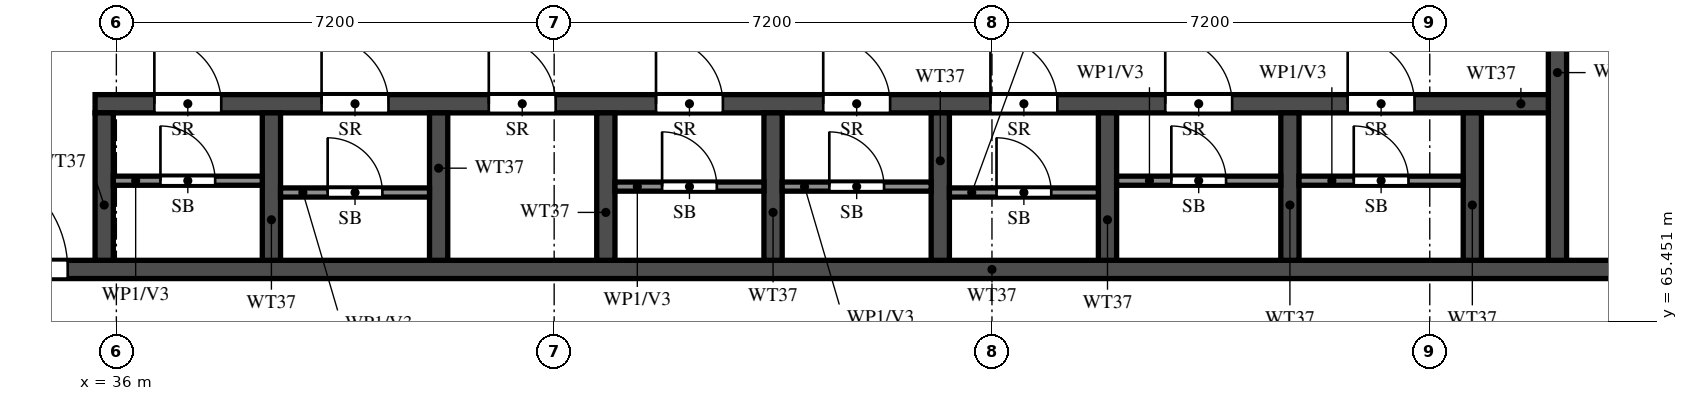
"""IFC4 building model, lengths in metres.
Left out: names, types, materials, properties, quantities, classifications, styles, units other than length and angle.
Written with IfcOpenShell. Run it as: python <this file> out.ifc"""

import sys

from ifc_helpers import new_model, si_unit, direction, frame, frame_2d, origin, place, context, subcontext, project, spatial, rectangle, extrude, element, fill, save


model = new_model("IFC4")
c1 = context("Model", 3, precision=1e-05, world=origin(), true_north=direction((0.0, 1.0)))
c2 = subcontext(c1, "Body", "Model", "MODEL_VIEW")
j1 = project(units=[si_unit("LENGTHUNIT", "METRE"), si_unit("PLANEANGLEUNIT", "RADIAN")], contexts=[c1])
p1 = place(None, origin())
s1 = spatial("IfcSite", under=j1, at=p1, CompositionType="ELEMENT")
p2 = place(p1, origin())
s2 = spatial("IfcBuilding", under=s1, at=p2, CompositionType="ELEMENT")
p3 = place(p2, frame((0.0, 0.0, 239.5)))
s3 = spatial("IfcBuildingStorey", under=s2, at=p3, CompositionType="ELEMENT", Elevation=239.5)
p4 = place(p3, frame((29.2, 66.3, 0.0), z_axis=(0.0, 0.0, 1.0), x_axis=(1.0, 0.0, 0.0)))
e1 = element("IfcWall", 1, at=p4, inside=s3, PredefinedType="SHEAR", context=c2, shape_type="SweptSolid", body=[
    extrude(rectangle(XDim=42.4, YDim=0.3, at=frame_2d((21.2, 0.0))), origin(), (0.0, 0.0, 1.0), 3.22),
])
p5 = place(p4, frame((1.425, 0.0, 0.0)))
e2 = element("IfcOpeningElement", 2, at=p5, cuts=e1, PredefinedType="OPENING", context=c2, shape_type="SweptSolid", body=[
    extrude(rectangle(XDim=1.1, YDim=2.1, at=frame_2d((0.55, 1.05))), frame((0.0, 0.16, 0.0), z_axis=(0.0, -1.0, 0.0), x_axis=(1.0, 0.0, 0.0)), (0.0, 0.0, 1.0), 0.32),
])
p6 = place(p4, frame((4.2, 0.0, 0.0)))
e3 = element("IfcOpeningElement", 3, at=p6, cuts=e1, PredefinedType="OPENING", context=c2, shape_type="SweptSolid", body=[
    extrude(rectangle(XDim=1.8, YDim=2.1, at=frame_2d((0.9, 1.05))), frame((0.0, 0.16, 0.0), z_axis=(0.0, -1.0, 0.0), x_axis=(1.0, 0.0, 0.0)), (0.0, 0.0, 1.0), 0.32),
])
p7 = place(p3, frame((35.65, 69.025, 0.0), z_axis=(0.0, 0.0, 1.0), x_axis=(1.0, 0.0, 0.0)))
e4 = element("IfcWall", 4, at=p7, inside=s3, PredefinedType="SHEAR", context=c2, shape_type="SweptSolid", body=[
    extrude(rectangle(XDim=24.05, YDim=0.3, at=frame_2d((12.025, 0.0))), origin(), (0.0, 0.0, 1.0), 3.22),
])
p8 = place(p7, frame((0.975, 0.0, 0.0)))
e5 = element("IfcOpeningElement", 5, at=p8, cuts=e4, PredefinedType="OPENING", context=c2, shape_type="SweptSolid", body=[
    extrude(rectangle(XDim=1.1, YDim=2.1, at=frame_2d((0.55, 1.05))), frame((0.0, 0.16, 0.0), z_axis=(0.0, -1.0, 0.0), x_axis=(1.0, 0.0, 0.0)), (0.0, 0.0, 1.0), 0.32),
])
p9 = place(p7, frame((3.725, 0.0, 0.0)))
e6 = element("IfcOpeningElement", 6, at=p9, cuts=e4, PredefinedType="OPENING", context=c2, shape_type="SweptSolid", body=[
    extrude(rectangle(XDim=1.1, YDim=2.1, at=frame_2d((0.55, 1.05))), frame((0.0, 0.16, 0.0), z_axis=(0.0, -1.0, 0.0), x_axis=(1.0, 0.0, 0.0)), (0.0, 0.0, 1.0), 0.32),
])
p10 = place(p7, frame((6.475, 0.0, 0.0)))
e7 = element("IfcOpeningElement", 7, at=p10, cuts=e4, PredefinedType="OPENING", context=c2, shape_type="SweptSolid", body=[
    extrude(rectangle(XDim=1.1, YDim=2.1, at=frame_2d((0.55, 1.05))), frame((0.0, 0.16, 0.0), z_axis=(0.0, -1.0, 0.0), x_axis=(1.0, 0.0, 0.0)), (0.0, 0.0, 1.0), 0.32),
])
p11 = place(p7, frame((9.225, 0.0, 0.0)))
e8 = element("IfcOpeningElement", 8, at=p11, cuts=e4, PredefinedType="OPENING", context=c2, shape_type="SweptSolid", body=[
    extrude(rectangle(XDim=1.1, YDim=2.1, at=frame_2d((0.55, 1.05))), frame((0.0, 0.16, 0.0), z_axis=(0.0, -1.0, 0.0), x_axis=(1.0, 0.0, 0.0)), (0.0, 0.0, 1.0), 0.32),
])
p12 = place(p7, frame((11.975, 0.0, 0.0)))
e9 = element("IfcOpeningElement", 9, at=p12, cuts=e4, PredefinedType="OPENING", context=c2, shape_type="SweptSolid", body=[
    extrude(rectangle(XDim=1.1, YDim=2.1, at=frame_2d((0.55, 1.05))), frame((0.0, 0.16, 0.0), z_axis=(0.0, -1.0, 0.0), x_axis=(1.0, 0.0, 0.0)), (0.0, 0.0, 1.0), 0.32),
])
p13 = place(p7, frame((14.725, 0.0, 0.0)))
e10 = element("IfcOpeningElement", 10, at=p13, cuts=e4, PredefinedType="OPENING", context=c2, shape_type="SweptSolid", body=[
    extrude(rectangle(XDim=1.1, YDim=2.1, at=frame_2d((0.55, 1.05))), frame((0.0, 0.16, 0.0), z_axis=(0.0, -1.0, 0.0), x_axis=(1.0, 0.0, 0.0)), (0.0, 0.0, 1.0), 0.32),
])
p14 = place(p7, frame((17.6, 0.0, 0.0)))
e11 = element("IfcOpeningElement", 11, at=p14, cuts=e4, PredefinedType="OPENING", context=c2, shape_type="SweptSolid", body=[
    extrude(rectangle(XDim=1.1, YDim=2.1, at=frame_2d((0.55, 1.05))), frame((0.0, 0.16, 0.0), z_axis=(0.0, -1.0, 0.0), x_axis=(1.0, 0.0, 0.0)), (0.0, 0.0, 1.0), 0.32),
])
p15 = place(p7, frame((20.6, 0.0, 0.0)))
e12 = element("IfcOpeningElement", 12, at=p15, cuts=e4, PredefinedType="OPENING", context=c2, shape_type="SweptSolid", body=[
    extrude(rectangle(XDim=1.1, YDim=2.1, at=frame_2d((0.55, 1.05))), frame((0.0, 0.16, 0.0), z_axis=(0.0, -1.0, 0.0), x_axis=(1.0, 0.0, 0.0)), (0.0, 0.0, 1.0), 0.32),
])
p16 = place(p3, frame((59.7, 66.45, 0.0), z_axis=(0.0, 0.0, 1.0), x_axis=(0.0, 1.0, 0.0)))
e13 = element("IfcWall", 13, at=p16, inside=s3, PredefinedType="SHEAR", context=c2, shape_type="SweptSolid", body=[
    extrude(rectangle(XDim=6.175, YDim=0.3, at=frame_2d((3.087, 0.0))), origin(), (0.0, 0.0, 1.0), 3.22),
])
p17 = place(p16, frame((3.85, 0.0, 0.0)))
e14 = element("IfcOpeningElement", 14, at=p17, cuts=e13, PredefinedType="OPENING", context=c2, shape_type="SweptSolid", body=[
    extrude(rectangle(XDim=1.2, YDim=2.1, at=frame_2d((0.6, 1.05))), frame((0.0, 0.16, 0.0), z_axis=(0.0, -1.0, 0.0), x_axis=(1.0, 0.0, 0.0)), (0.0, 0.0, 1.0), 0.32),
])
for number, where, z_axis, x_axis in (
    (15, (35.8, 66.45, 0.0), (0.0, 0.0, 1.0), (0.0, 1.0, 0.0)),
    (16, (38.55, 66.45, 0.0), (0.0, 0.0, 1.0), (0.0, 1.0, 0.0)),
    (17, (41.3, 66.45, 0.0), (0.0, 0.0, 1.0), (0.0, 1.0, 0.0)),
    (18, (44.05, 66.45, 0.0), (0.0, 0.0, 1.0), (0.0, 1.0, 0.0)),
    (19, (46.8, 66.45, 0.0), (0.0, 0.0, 1.0), (0.0, 1.0, 0.0)),
    (20, (49.55, 66.45, 0.0), (0.0, 0.0, 1.0), (0.0, 1.0, 0.0)),
    (21, (52.3, 66.45, 0.0), (0.0, 0.0, 1.0), (0.0, 1.0, 0.0)),
    (22, (55.3, 66.45, 0.0), (0.0, 0.0, 1.0), (0.0, 1.0, 0.0)),
    (23, (58.3, 66.45, 0.0), (0.0, 0.0, 1.0), (0.0, 1.0, 0.0)),
):
    element("IfcWall", number, at=place(p3, frame(where, z_axis=z_axis, x_axis=x_axis)), inside=s3, PredefinedType="SHEAR", context=c2, shape_type="SweptSolid", body=[
        extrude(rectangle(XDim=2.425, YDim=0.3, at=frame_2d((1.212, 0.0))), origin(), (0.0, 0.0, 1.0), 3.22),
    ])
p18 = place(p3, frame((35.95, 67.76, 0.0), z_axis=(0.0, 0.0, 1.0), x_axis=(1.0, 0.0, 0.0)))
e24 = element("IfcWall", 24, at=p18, inside=s3, PredefinedType="PARTITIONING", context=c2, shape_type="SweptSolid", body=[
    extrude(rectangle(XDim=2.45, YDim=0.15, at=frame_2d((1.225, 0.0))), origin(), (0.0, 0.0, 1.0), 3.22),
])
p19 = place(p18, frame((0.775, 0.0, 0.0)))
e25 = element("IfcOpeningElement", 25, at=p19, cuts=e24, PredefinedType="OPENING", context=c2, shape_type="SweptSolid", body=[
    extrude(rectangle(XDim=0.9, YDim=2.1, at=frame_2d((0.45, 1.05))), frame((0.0, 0.085, 0.0), z_axis=(0.0, -1.0, 0.0), x_axis=(1.0, 0.0, 0.0)), (0.0, 0.0, 1.0), 0.17),
])
p20 = place(p3, frame((38.7, 67.565, 0.0), z_axis=(0.0, 0.0, 1.0), x_axis=(1.0, 0.0, 0.0)))
e26 = element("IfcWall", 26, at=p20, inside=s3, PredefinedType="PARTITIONING", context=c2, shape_type="SweptSolid", body=[
    extrude(rectangle(XDim=2.45, YDim=0.15, at=frame_2d((1.225, 0.0))), origin(), (0.0, 0.0, 1.0), 3.22),
])
p21 = place(p20, frame((0.775, 0.0, 0.0)))
e27 = element("IfcOpeningElement", 27, at=p21, cuts=e26, PredefinedType="OPENING", context=c2, shape_type="SweptSolid", body=[
    extrude(rectangle(XDim=0.9, YDim=2.1, at=frame_2d((0.45, 1.05))), frame((0.0, 0.085, 0.0), z_axis=(0.0, -1.0, 0.0), x_axis=(1.0, 0.0, 0.0)), (0.0, 0.0, 1.0), 0.17),
])
p22 = place(p3, frame((44.2, 67.663, 0.0), z_axis=(0.0, 0.0, 1.0), x_axis=(1.0, 0.0, 0.0)))
e28 = element("IfcWall", 28, at=p22, inside=s3, PredefinedType="PARTITIONING", context=c2, shape_type="SweptSolid", body=[
    extrude(rectangle(XDim=2.45, YDim=0.15, at=frame_2d((1.225, 0.0))), origin(), (0.0, 0.0, 1.0), 3.22),
])
p23 = place(p22, frame((0.775, 0.0, 0.0)))
e29 = element("IfcOpeningElement", 29, at=p23, cuts=e28, PredefinedType="OPENING", context=c2, shape_type="SweptSolid", body=[
    extrude(rectangle(XDim=0.9, YDim=2.1, at=frame_2d((0.45, 1.05))), frame((0.0, 0.085, 0.0), z_axis=(0.0, -1.0, 0.0), x_axis=(1.0, 0.0, 0.0)), (0.0, 0.0, 1.0), 0.17),
])
p24 = place(p3, frame((46.95, 67.663, 0.0), z_axis=(0.0, 0.0, 1.0), x_axis=(1.0, 0.0, 0.0)))
e30 = element("IfcWall", 30, at=p24, inside=s3, PredefinedType="PARTITIONING", context=c2, shape_type="SweptSolid", body=[
    extrude(rectangle(XDim=2.45, YDim=0.15, at=frame_2d((1.225, 0.0))), origin(), (0.0, 0.0, 1.0), 3.22),
])
p25 = place(p24, frame((0.775, 0.0, 0.0)))
e31 = element("IfcOpeningElement", 31, at=p25, cuts=e30, PredefinedType="OPENING", context=c2, shape_type="SweptSolid", body=[
    extrude(rectangle(XDim=0.9, YDim=2.1, at=frame_2d((0.45, 1.05))), frame((0.0, 0.085, 0.0), z_axis=(0.0, -1.0, 0.0), x_axis=(1.0, 0.0, 0.0)), (0.0, 0.0, 1.0), 0.17),
])
p26 = place(p3, frame((49.7, 67.565, 0.0), z_axis=(0.0, 0.0, 1.0), x_axis=(1.0, 0.0, 0.0)))
e32 = element("IfcWall", 32, at=p26, inside=s3, PredefinedType="PARTITIONING", context=c2, shape_type="SweptSolid", body=[
    extrude(rectangle(XDim=2.45, YDim=0.15, at=frame_2d((1.225, 0.0))), origin(), (0.0, 0.0, 1.0), 3.22),
])
p27 = place(p26, frame((0.775, 0.0, 0.0)))
e33 = element("IfcOpeningElement", 33, at=p27, cuts=e32, PredefinedType="OPENING", context=c2, shape_type="SweptSolid", body=[
    extrude(rectangle(XDim=0.9, YDim=2.1, at=frame_2d((0.45, 1.05))), frame((0.0, 0.085, 0.0), z_axis=(0.0, -1.0, 0.0), x_axis=(1.0, 0.0, 0.0)), (0.0, 0.0, 1.0), 0.17),
])
p28 = place(p3, frame((52.45, 67.76, 0.0), z_axis=(0.0, 0.0, 1.0), x_axis=(1.0, 0.0, 0.0)))
e34 = element("IfcWall", 34, at=p28, inside=s3, PredefinedType="PARTITIONING", context=c2, shape_type="SweptSolid", body=[
    extrude(rectangle(XDim=2.7, YDim=0.15, at=frame_2d((1.35, 0.0))), origin(), (0.0, 0.0, 1.0), 3.22),
])
p29 = place(p28, frame((0.9, 0.0, 0.0)))
e35 = element("IfcOpeningElement", 35, at=p29, cuts=e34, PredefinedType="OPENING", context=c2, shape_type="SweptSolid", body=[
    extrude(rectangle(XDim=0.9, YDim=2.1, at=frame_2d((0.45, 1.05))), frame((0.0, 0.085, 0.0), z_axis=(0.0, -1.0, 0.0), x_axis=(1.0, 0.0, 0.0)), (0.0, 0.0, 1.0), 0.17),
])
p30 = place(p3, frame((55.45, 67.76, 0.0), z_axis=(0.0, 0.0, 1.0), x_axis=(1.0, 0.0, 0.0)))
e36 = element("IfcWall", 36, at=p30, inside=s3, PredefinedType="PARTITIONING", context=c2, shape_type="SweptSolid", body=[
    extrude(rectangle(XDim=2.7, YDim=0.15, at=frame_2d((1.35, 0.0))), origin(), (0.0, 0.0, 1.0), 3.22),
])
p31 = place(p30, frame((0.9, 0.0, 0.0)))
e37 = element("IfcOpeningElement", 37, at=p31, cuts=e36, PredefinedType="OPENING", context=c2, shape_type="SweptSolid", body=[
    extrude(rectangle(XDim=0.9, YDim=2.1, at=frame_2d((0.45, 1.05))), frame((0.0, 0.085, 0.0), z_axis=(0.0, -1.0, 0.0), x_axis=(1.0, 0.0, 0.0)), (0.0, 0.0, 1.0), 0.17),
])
p32 = place(p6, origin())
e38 = element("IfcDoor", 38, at=p32, inside=s3, OperationType="DOUBLE_DOOR_SINGLE_SWING", PredefinedType="DOOR", context=c2, shape_type="SweptSolid", body=[
    extrude(rectangle(XDim=1.8, YDim=2.1, at=frame_2d((0.9, 1.05))), frame((0.0, 0.025, 0.0), z_axis=(0.0, -1.0, 0.0), x_axis=(1.0, 0.0, 0.0)), (0.0, 0.0, 1.0), 0.05),
])
fill(e3, e38)
p33 = place(p8, origin())
e39 = element("IfcDoor", 39, at=p33, inside=s3, OperationType="SINGLE_SWING_RIGHT", PredefinedType="DOOR", context=c2, shape_type="SweptSolid", body=[
    extrude(rectangle(XDim=1.1, YDim=2.1, at=frame_2d((0.55, 1.05))), frame((0.0, 0.025, 0.0), z_axis=(0.0, -1.0, 0.0), x_axis=(1.0, 0.0, 0.0)), (0.0, 0.0, 1.0), 0.05),
])
fill(e5, e39)
p34 = place(p19, origin())
e40 = element("IfcDoor", 40, at=p34, inside=s3, OperationType="SINGLE_SWING_LEFT", PredefinedType="DOOR", context=c2, shape_type="SweptSolid", body=[
    extrude(rectangle(XDim=0.9, YDim=2.1, at=frame_2d((0.45, 1.05))), frame((0.0, 0.025, 0.0), z_axis=(0.0, -1.0, 0.0), x_axis=(1.0, 0.0, 0.0)), (0.0, 0.0, 1.0), 0.05),
])
fill(e25, e40)
p35 = place(p9, origin())
e41 = element("IfcDoor", 41, at=p35, inside=s3, OperationType="SINGLE_SWING_LEFT", PredefinedType="DOOR", context=c2, shape_type="SweptSolid", body=[
    extrude(rectangle(XDim=1.1, YDim=2.1, at=frame_2d((0.55, 1.05))), frame((0.0, 0.025, 0.0), z_axis=(0.0, -1.0, 0.0), x_axis=(1.0, 0.0, 0.0)), (0.0, 0.0, 1.0), 0.05),
])
fill(e6, e41)
p36 = place(p21, origin())
e42 = element("IfcDoor", 42, at=p36, inside=s3, OperationType="SINGLE_SWING_LEFT", PredefinedType="DOOR", context=c2, shape_type="SweptSolid", body=[
    extrude(rectangle(XDim=0.9, YDim=2.1, at=frame_2d((0.45, 1.05))), frame((0.0, 0.025, 0.0), z_axis=(0.0, -1.0, 0.0), x_axis=(1.0, 0.0, 0.0)), (0.0, 0.0, 1.0), 0.05),
])
fill(e27, e42)
p37 = place(p10, origin())
e43 = element("IfcDoor", 43, at=p37, inside=s3, OperationType="SINGLE_SWING_RIGHT", PredefinedType="DOOR", context=c2, shape_type="SweptSolid", body=[
    extrude(rectangle(XDim=1.1, YDim=2.1, at=frame_2d((0.55, 1.05))), frame((0.0, 0.025, 0.0), z_axis=(0.0, -1.0, 0.0), x_axis=(1.0, 0.0, 0.0)), (0.0, 0.0, 1.0), 0.05),
])
fill(e7, e43)
p38 = place(p11, origin())
e44 = element("IfcDoor", 44, at=p38, inside=s3, OperationType="SINGLE_SWING_LEFT", PredefinedType="DOOR", context=c2, shape_type="SweptSolid", body=[
    extrude(rectangle(XDim=1.1, YDim=2.1, at=frame_2d((0.55, 1.05))), frame((0.0, 0.025, 0.0), z_axis=(0.0, -1.0, 0.0), x_axis=(1.0, 0.0, 0.0)), (0.0, 0.0, 1.0), 0.05),
])
fill(e8, e44)
p39 = place(p23, origin())
e45 = element("IfcDoor", 45, at=p39, inside=s3, OperationType="SINGLE_SWING_LEFT", PredefinedType="DOOR", context=c2, shape_type="SweptSolid", body=[
    extrude(rectangle(XDim=0.9, YDim=2.1, at=frame_2d((0.45, 1.05))), frame((0.0, 0.025, 0.0), z_axis=(0.0, -1.0, 0.0), x_axis=(1.0, 0.0, 0.0)), (0.0, 0.0, 1.0), 0.05),
])
fill(e29, e45)
p40 = place(p12, origin())
e46 = element("IfcDoor", 46, at=p40, inside=s3, OperationType="SINGLE_SWING_RIGHT", PredefinedType="DOOR", context=c2, shape_type="SweptSolid", body=[
    extrude(rectangle(XDim=1.1, YDim=2.1, at=frame_2d((0.55, 1.05))), frame((0.0, 0.025, 0.0), z_axis=(0.0, -1.0, 0.0), x_axis=(1.0, 0.0, 0.0)), (0.0, 0.0, 1.0), 0.05),
])
fill(e9, e46)
p41 = place(p25, origin())
e47 = element("IfcDoor", 47, at=p41, inside=s3, OperationType="SINGLE_SWING_RIGHT", PredefinedType="DOOR", context=c2, shape_type="SweptSolid", body=[
    extrude(rectangle(XDim=0.9, YDim=2.1, at=frame_2d((0.45, 1.05))), frame((0.0, 0.025, 0.0), z_axis=(0.0, -1.0, 0.0), x_axis=(1.0, 0.0, 0.0)), (0.0, 0.0, 1.0), 0.05),
])
fill(e31, e47)
p42 = place(p13, origin())
e48 = element("IfcDoor", 48, at=p42, inside=s3, OperationType="SINGLE_SWING_LEFT", PredefinedType="DOOR", context=c2, shape_type="SweptSolid", body=[
    extrude(rectangle(XDim=1.1, YDim=2.1, at=frame_2d((0.55, 1.05))), frame((0.0, 0.025, 0.0), z_axis=(0.0, -1.0, 0.0), x_axis=(1.0, 0.0, 0.0)), (0.0, 0.0, 1.0), 0.05),
])
fill(e10, e48)
p43 = place(p27, origin())
e49 = element("IfcDoor", 49, at=p43, inside=s3, OperationType="SINGLE_SWING_LEFT", PredefinedType="DOOR", context=c2, shape_type="SweptSolid", body=[
    extrude(rectangle(XDim=0.9, YDim=2.1, at=frame_2d((0.45, 1.05))), frame((0.0, 0.025, 0.0), z_axis=(0.0, -1.0, 0.0), x_axis=(1.0, 0.0, 0.0)), (0.0, 0.0, 1.0), 0.05),
])
fill(e33, e49)
p44 = place(p14, origin())
e50 = element("IfcDoor", 50, at=p44, inside=s3, OperationType="SINGLE_SWING_RIGHT", PredefinedType="DOOR", context=c2, shape_type="SweptSolid", body=[
    extrude(rectangle(XDim=1.1, YDim=2.1, at=frame_2d((0.55, 1.05))), frame((0.0, 0.025, 0.0), z_axis=(0.0, -1.0, 0.0), x_axis=(1.0, 0.0, 0.0)), (0.0, 0.0, 1.0), 0.05),
])
fill(e11, e50)
p45 = place(p29, origin())
e51 = element("IfcDoor", 51, at=p45, inside=s3, OperationType="SINGLE_SWING_LEFT", PredefinedType="DOOR", context=c2, shape_type="SweptSolid", body=[
    extrude(rectangle(XDim=0.9, YDim=2.1, at=frame_2d((0.45, 1.05))), frame((0.0, 0.025, 0.0), z_axis=(0.0, -1.0, 0.0), x_axis=(1.0, 0.0, 0.0)), (0.0, 0.0, 1.0), 0.05),
])
fill(e35, e51)
p46 = place(p15, origin())
e52 = element("IfcDoor", 52, at=p46, inside=s3, OperationType="SINGLE_SWING_RIGHT", PredefinedType="DOOR", context=c2, shape_type="SweptSolid", body=[
    extrude(rectangle(XDim=1.1, YDim=2.1, at=frame_2d((0.55, 1.05))), frame((0.0, 0.025, 0.0), z_axis=(0.0, -1.0, 0.0), x_axis=(1.0, 0.0, 0.0)), (0.0, 0.0, 1.0), 0.05),
])
fill(e12, e52)
p47 = place(p31, origin())
e53 = element("IfcDoor", 53, at=p47, inside=s3, OperationType="SINGLE_SWING_LEFT", PredefinedType="DOOR", context=c2, shape_type="SweptSolid", body=[
    extrude(rectangle(XDim=0.9, YDim=2.1, at=frame_2d((0.45, 1.05))), frame((0.0, 0.025, 0.0), z_axis=(0.0, -1.0, 0.0), x_axis=(1.0, 0.0, 0.0)), (0.0, 0.0, 1.0), 0.05),
])
fill(e37, e53)
save(model, sys.argv[1])
